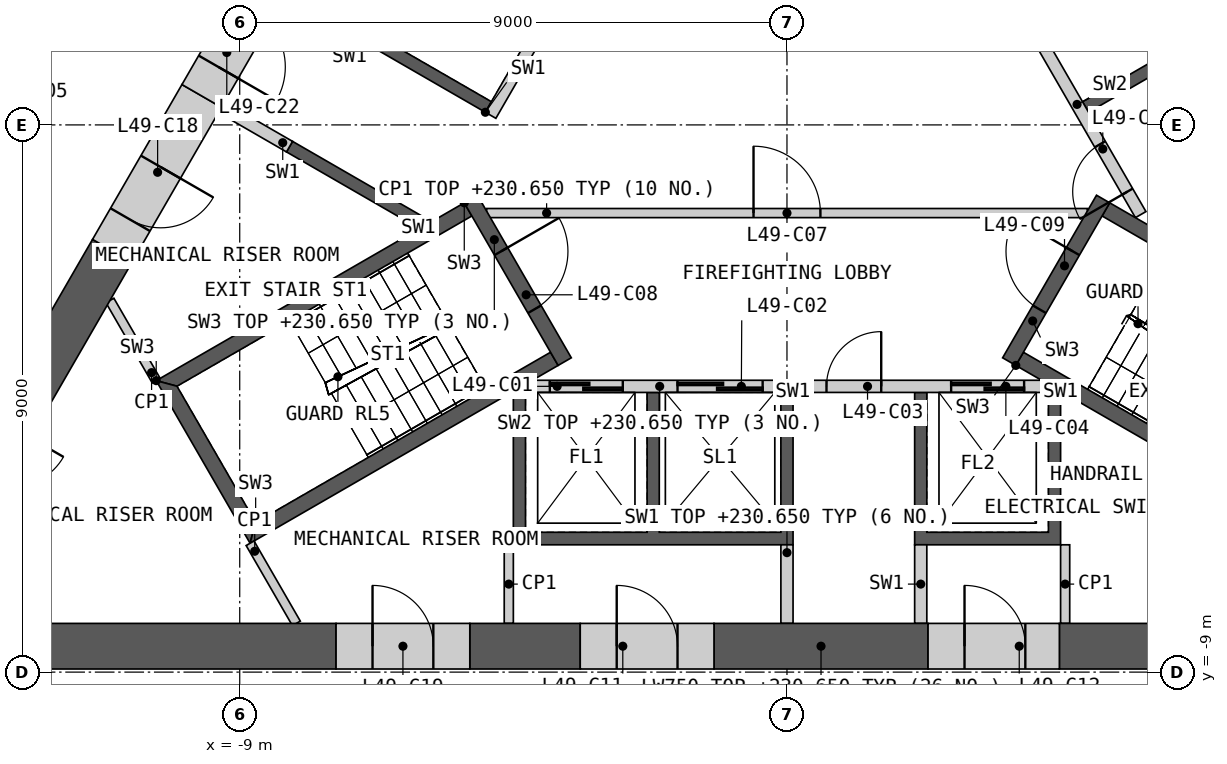
"""IFC4 building model, lengths in metres.
Left out: names, types, materials, properties, quantities, classifications, styles, units other than length and angle.
Written with IfcOpenShell. Run it as: python <this file> out.ifc"""

import sys

from ifc_helpers import new_model, si_unit, direction, frame, frame_2d, origin, place, context, subcontext, project, spatial, polyline, rectangle, outline, extrude, element, fill, save


model = new_model("IFC4")
c1 = context("Model", 3, precision=1e-05, world=origin(), true_north=direction((0.0, 1.0)))
c2 = subcontext(c1, "Body", "Model", "MODEL_VIEW")
j1 = project(units=[si_unit("LENGTHUNIT", "METRE"), si_unit("PLANEANGLEUNIT", "RADIAN")], contexts=[c1])
p1 = place(None, origin())
s1 = spatial("IfcSite", under=j1, at=p1, CompositionType="ELEMENT")
p2 = place(p1, origin())
s2 = spatial("IfcBuilding", under=s1, at=p2, CompositionType="ELEMENT")
p3 = place(p2, frame((0.0, 0.0, 226.0)))
s3 = spatial("IfcBuildingStorey", under=s2, at=p3, CompositionType="ELEMENT", Elevation=226.0)
p4 = place(p3, origin())
e1 = element("IfcWall", 1, at=p4, inside=s3, PredefinedType="SHEAR", context=c2, shape_type="SweptSolid", body=[
    extrude(outline(polyline([(4.5, -4.4), (4.5, -6.906), (2.1, -6.906), (2.1, -4.4), (2.3, -4.4), (2.3, -6.7), (4.3, -6.7), (4.3, -4.4), (4.5, -4.4)])), origin(), (0.0, 0.0, 1.0), 4.65),
])
p5 = place(p3, origin())
e2 = element("IfcWall", 2, at=p5, inside=s3, PredefinedType="SHEAR", context=c2, shape_type="SweptSolid", body=[
    extrude(outline(polyline([(0.1, -4.4), (0.1, -6.906), (-4.5, -6.906), (-4.5, -4.4), (-4.3, -4.4), (-4.3, -6.7), (-2.3, -6.7), (-2.3, -4.4), (-2.1, -4.4), (-2.1, -6.7), (-0.1, -6.7), (-0.1, -4.4), (0.1, -4.4)])), origin(), (0.0, 0.0, 1.0), 4.65),
])
p6 = place(p3, frame((-4.187, -4.3, 0.0), z_axis=(0.0, 0.0, 1.0), x_axis=(1.0, 0.0, 0.0)))
e3 = element("IfcWall", 3, at=p6, inside=s3, PredefinedType="SOLIDWALL", context=c2, shape_type="SweptSolid", body=[
    extrude(rectangle(XDim=8.373, YDim=0.2, at=frame_2d((4.187, 0.0))), origin(), (0.0, 0.0, 1.0), 4.65),
])
p7 = place(p6, frame((0.287, 0.0, 0.0)))
e4 = element("IfcOpeningElement", 4, at=p7, cuts=e3, PredefinedType="OPENING", context=c2, shape_type="SweptSolid", body=[
    extrude(rectangle(XDim=1.2, YDim=2.1, at=frame_2d((0.6, 1.05))), frame((0.0, 0.11, 0.0), z_axis=(0.0, -1.0, 0.0), x_axis=(1.0, 0.0, 0.0)), (0.0, 0.0, 1.0), 0.22),
])
p8 = place(p6, frame((2.387, 0.0, 0.0)))
e5 = element("IfcOpeningElement", 5, at=p8, cuts=e3, PredefinedType="OPENING", context=c2, shape_type="SweptSolid", body=[
    extrude(rectangle(XDim=1.4, YDim=2.1, at=frame_2d((0.7, 1.05))), frame((0.0, 0.11, 0.0), z_axis=(0.0, -1.0, 0.0), x_axis=(1.0, 0.0, 0.0)), (0.0, 0.0, 1.0), 0.22),
])
p9 = place(p6, frame((4.837, 0.0, 0.0)))
e6 = element("IfcOpeningElement", 6, at=p9, cuts=e3, PredefinedType="OPENING", context=c2, shape_type="SweptSolid", body=[
    extrude(rectangle(XDim=0.9, YDim=2.1, at=frame_2d((0.45, 1.05))), frame((0.0, 0.11, 0.0), z_axis=(0.0, -1.0, 0.0), x_axis=(1.0, 0.0, 0.0)), (0.0, 0.0, 1.0), 0.22),
])
p10 = place(p6, frame((6.887, 0.0, 0.0)))
e7 = element("IfcOpeningElement", 7, at=p10, cuts=e3, PredefinedType="OPENING", context=c2, shape_type="SweptSolid", body=[
    extrude(rectangle(XDim=1.2, YDim=2.1, at=frame_2d((0.6, 1.05))), frame((0.0, 0.11, 0.0), z_axis=(0.0, -1.0, 0.0), x_axis=(1.0, 0.0, 0.0)), (0.0, 0.0, 1.0), 0.22),
])
for number, where, z_axis, x_axis in (
    (8, (0.0, -6.906, 0.0), (0.0, 0.0, 1.0), (0.0, -1.0, 0.0)),
    (9, (2.2, -6.906, 0.0), (0.0, 0.0, 1.0), (0.0, -1.0, 0.0)),
):
    element("IfcWall", number, at=place(p3, frame(where, z_axis=z_axis, x_axis=x_axis)), inside=s3, PredefinedType="SHEAR", context=c2, shape_type="SweptSolid", body=[
        extrude(rectangle(XDim=1.293, YDim=0.2, at=frame_2d((0.646, 0.0))), origin(), (0.0, 0.0, 1.0), 4.65),
    ])
p11 = place(p3, origin())
e10 = element("IfcWall", 10, at=p11, inside=s3, PredefinedType="SHEAR", context=c2, shape_type="SweptSolid", body=[
    extrude(outline(polyline([(1.561, 6.097), (3.731, 7.35), (7.131, 1.461), (4.96, 0.208), (4.861, 0.381), (6.852, 1.531), (4.752, 5.169), (2.76, 4.019), (2.66, 4.192), (4.652, 5.342), (3.652, 7.074), (1.66, 5.924), (1.561, 6.097)])), origin(), (0.0, 0.0, 1.0), 4.65),
])
p12 = place(p3, frame((5.817, -1.476, 0.0), z_axis=(0.0, 0.0, 1.0), x_axis=(-0.500002616675, 0.866023893041, 0.0)))
e11 = element("IfcWall", 11, at=p12, inside=s3, PredefinedType="SOLIDWALL", context=c2, shape_type="SweptSolid", body=[
    extrude(rectangle(XDim=8.373, YDim=0.2, at=frame_2d((4.187, 0.0))), origin(), (0.0, 0.0, 1.0), 4.65),
])
p13 = place(p12, frame((0.437, 0.0, 0.0)))
e12 = element("IfcOpeningElement", 12, at=p13, cuts=e11, PredefinedType="OPENING", context=c2, shape_type="SweptSolid", body=[
    extrude(rectangle(XDim=0.9, YDim=2.1, at=frame_2d((0.45, 1.05))), frame((0.0, 0.11, 0.0), z_axis=(0.0, -1.0, 0.0), x_axis=(1.0, 0.0, 0.0)), (0.0, 0.0, 1.0), 0.22),
])
p14 = place(p12, frame((3.737, 0.0, 0.0)))
e13 = element("IfcOpeningElement", 13, at=p14, cuts=e11, PredefinedType="OPENING", context=c2, shape_type="SweptSolid", body=[
    extrude(rectangle(XDim=0.9, YDim=2.1, at=frame_2d((0.45, 1.05))), frame((0.0, 0.11, 0.0), z_axis=(0.0, -1.0, 0.0), x_axis=(1.0, 0.0, 0.0)), (0.0, 0.0, 1.0), 0.22),
])
p15 = place(p3, origin())
e14 = element("IfcWall", 14, at=p15, inside=s3, PredefinedType="SHEAR", context=c2, shape_type="SweptSolid", body=[
    extrude(outline(polyline([(-6.061, -1.697), (-8.231, -0.444), (-8.131, -0.271), (-5.96, -1.524), (-6.061, -1.697)])), origin(), (0.0, 0.0, 1.0), 4.65),
])
p16 = place(p3, origin())
e15 = element("IfcWall", 15, at=p16, inside=s3, PredefinedType="SHEAR", context=c2, shape_type="SweptSolid", body=[
    extrude(outline(polyline([(-4.96, 0.208), (-7.131, 1.461), (-3.731, 7.35), (-1.561, 6.097), (-1.66, 5.924), (-3.652, 7.074), (-4.652, 5.342), (-2.66, 4.192), (-2.76, 4.019), (-4.752, 5.169), (-5.752, 3.437), (-3.76, 2.287), (-3.861, 2.113), (-5.852, 3.263), (-6.852, 1.531), (-4.861, 0.381), (-4.96, 0.208)])), origin(), (0.0, 0.0, 1.0), 4.65),
])
p17 = place(p3, frame((-1.631, 5.776, 0.0), z_axis=(0.0, 0.0, 1.0), x_axis=(-0.499992876559, -0.866029516466, 0.0)))
e16 = element("IfcWall", 16, at=p17, inside=s3, PredefinedType="SOLIDWALL", context=c2, shape_type="SweptSolid", body=[
    extrude(rectangle(XDim=6.486, YDim=0.2, at=frame_2d((3.243, 0.0))), origin(), (0.0, 0.0, 1.0), 4.65),
])
p18 = place(p3, frame((-8.181, -0.357, 0.0), z_axis=(0.0, 0.0, 1.0), x_axis=(-0.866003189247, 0.500038474733, 0.0)))
e17 = element("IfcWall", 17, at=p18, inside=s3, PredefinedType="SHEAR", context=c2, shape_type="SweptSolid", body=[
    extrude(rectangle(XDim=1.293, YDim=0.2, at=frame_2d((0.646, 0.0))), origin(), (0.0, 0.0, 1.0), 4.65),
])
p19 = place(p3, frame((-4.941, -1.45, 0.0), z_axis=(0.0, 0.0, 1.0), x_axis=(1.0, 0.0, 0.0)))
e18 = element("IfcWall", 18, at=p19, inside=s3, PredefinedType="PARTITIONING", context=c2, shape_type="SweptSolid", body=[
    extrude(rectangle(XDim=9.882, YDim=0.15, at=frame_2d((4.941, 0.0))), origin(), (0.0, 0.0, 1.0), 4.65),
])
p20 = place(p19, frame((4.391, 0.0, 0.0)))
e19 = element("IfcOpeningElement", 19, at=p20, cuts=e18, PredefinedType="OPENING", context=c2, shape_type="SweptSolid", body=[
    extrude(rectangle(XDim=1.1, YDim=2.1, at=frame_2d((0.55, 1.05))), frame((0.0, 0.085, 0.0), z_axis=(0.0, -1.0, 0.0), x_axis=(1.0, 0.0, 0.0)), (0.0, 0.0, 1.0), 0.17),
])
p21 = place(p3, origin())
e20 = element("IfcWall", 20, at=p21, inside=s3, PredefinedType="SHEAR", context=c2, shape_type="SweptSolid", body=[
    extrude(outline(polyline([(-5.307, -1.281), (-10.374, -4.206), (-10.032, -4.298), (-5.182, -1.498), (-5.307, -1.281)])), origin(), (0.0, 0.0, 1.0), 4.65),
])
p22 = place(p3, origin())
e21 = element("IfcWall", 21, at=p22, inside=s3, PredefinedType="SHEAR", context=c2, shape_type="SweptSolid", body=[
    extrude(outline(polyline([(-10.374, -4.206), (-8.83, -6.881), (-8.738, -6.539), (-10.032, -4.298), (-10.374, -4.206)])), origin(), (0.0, 0.0, 1.0), 4.65),
])
p23 = place(p3, origin())
e22 = element("IfcWall", 22, at=p23, inside=s3, PredefinedType="SHEAR", context=c2, shape_type="SweptSolid", body=[
    extrude(outline(polyline([(-8.738, -6.539), (-8.83, -6.881), (-3.763, -3.956), (-3.888, -3.739), (-8.738, -6.539)])), origin(), (0.0, 0.0, 1.0), 4.65),
])
p24 = place(p3, frame((-5.199, -1.219, 0.0), z_axis=(0.0, 0.0, 1.0), x_axis=(0.499982516597, -0.866035497597, 0.0)))
e23 = element("IfcWall", 23, at=p24, inside=s3, PredefinedType="SHEAR", context=c2, shape_type="SweptSolid", body=[
    extrude(rectangle(XDim=3.088, YDim=0.25, at=frame_2d((1.544, 0.0))), origin(), (0.0, 0.0, 1.0), 4.65),
])
p25 = place(p24, frame((0.994, 0.0, 0.0)))
e24 = element("IfcOpeningElement", 24, at=p25, cuts=e23, PredefinedType="OPENING", context=c2, shape_type="SweptSolid", body=[
    extrude(rectangle(XDim=1.1, YDim=2.1, at=frame_2d((0.55, 1.05))), frame((0.0, 0.135, 0.0), z_axis=(0.0, -1.0, 0.0), x_axis=(1.0, 0.0, 0.0)), (0.0, 0.0, 1.0), 0.27),
])
p26 = place(p3, origin())
e25 = element("IfcWall", 25, at=p26, inside=s3, PredefinedType="SHEAR", context=c2, shape_type="SweptSolid", body=[
    extrude(outline(polyline([(3.763, -3.956), (8.83, -6.881), (8.738, -6.539), (3.888, -3.739), (3.763, -3.956)])), origin(), (0.0, 0.0, 1.0), 4.65),
])
p27 = place(p3, origin())
e26 = element("IfcWall", 26, at=p27, inside=s3, PredefinedType="SHEAR", context=c2, shape_type="SweptSolid", body=[
    extrude(outline(polyline([(10.032, -4.298), (10.374, -4.206), (5.307, -1.281), (5.182, -1.498), (10.032, -4.298)])), origin(), (0.0, 0.0, 1.0), 4.65),
])
p28 = place(p3, frame((3.655, -3.893, 0.0), z_axis=(0.0, 0.0, 1.0), x_axis=(0.499982516597, 0.866035497597, 0.0)))
e27 = element("IfcWall", 27, at=p28, inside=s3, PredefinedType="SHEAR", context=c2, shape_type="SweptSolid", body=[
    extrude(rectangle(XDim=3.088, YDim=0.25, at=frame_2d((1.544, 0.0))), origin(), (0.0, 0.0, 1.0), 4.65),
])
p29 = place(p28, frame((0.994, 0.0, 0.0)))
e28 = element("IfcOpeningElement", 28, at=p29, cuts=e27, PredefinedType="OPENING", context=c2, shape_type="SweptSolid", body=[
    extrude(rectangle(XDim=1.1, YDim=2.1, at=frame_2d((0.55, 1.05))), frame((0.0, 0.135, 0.0), z_axis=(0.0, -1.0, 0.0), x_axis=(1.0, 0.0, 0.0)), (0.0, 0.0, 1.0), 0.27),
])
for number, where, z_axis, x_axis in (
    (29, (4.575, -6.906, 0.0), (0.0, 0.0, 1.0), (0.0, -1.0, 0.0)),
    (30, (-4.575, -6.906, 0.0), (0.0, 0.0, 1.0), (0.0, -1.0, 0.0)),
):
    element("IfcWall", number, at=place(p3, frame(where, z_axis=z_axis, x_axis=x_axis)), inside=s3, PredefinedType="PARTITIONING", context=c2, shape_type="SweptSolid", body=[
        extrude(rectangle(XDim=1.293, YDim=0.15, at=frame_2d((0.646, 0.0))), origin(), (0.0, 0.0, 1.0), 4.65),
    ])
for number, where, z_axis, x_axis in (
    (31, (-8.83, -6.881, 0.0), (0.0, 0.0, 1.0), (0.5, -0.866, 0.0)),
    (32, (-10.374, -4.206, 0.0), (0.0, 0.0, 1.0), (-0.5, 0.866, 0.0)),
):
    element("IfcWall", number, at=place(p3, frame(where, z_axis=z_axis, x_axis=x_axis)), inside=s3, PredefinedType="PARTITIONING", context=c2, shape_type="SweptSolid", body=[
        extrude(rectangle(XDim=1.522, YDim=0.15, at=frame_2d((0.761, 0.0))), origin(), (0.0, 0.0, 1.0), 4.65),
    ])
p30 = place(p3, frame((-14.201, -8.574, 0.0), z_axis=(0.0, 0.0, 1.0), x_axis=(1.0, 0.0, 0.0)))
e33 = element("IfcWall", 33, at=p30, inside=s3, PredefinedType="SHEAR", context=c2, shape_type="SweptSolid", body=[
    extrude(rectangle(XDim=6.785, YDim=0.75, at=frame_2d((3.393, 0.0))), origin(), (0.0, 0.0, 1.0), 4.65),
])
p31 = place(p3, frame((4.48, -8.574, 0.0), z_axis=(0.0, 0.0, 1.0), x_axis=(1.0, 0.0, 0.0)))
e34 = element("IfcWall", 34, at=p31, inside=s3, PredefinedType="SHEAR", context=c2, shape_type="SweptSolid", body=[
    extrude(rectangle(XDim=3.845, YDim=0.75, at=frame_2d((1.923, 0.0))), origin(), (0.0, 0.0, 1.0), 4.65),
])
p32 = place(p3, frame((-1.2, -8.574, 0.0), z_axis=(0.0, 0.0, 1.0), x_axis=(1.0, 0.0, 0.0)))
e35 = element("IfcWall", 35, at=p32, inside=s3, PredefinedType="SHEAR", context=c2, shape_type="SweptSolid", body=[
    extrude(rectangle(XDim=3.52, YDim=0.75, at=frame_2d((1.76, 0.0))), origin(), (0.0, 0.0, 1.0), 4.65),
])
p33 = place(p3, frame((-5.216, -8.574, 0.0), z_axis=(0.0, 0.0, 1.0), x_axis=(1.0, 0.0, 0.0)))
e36 = element("IfcWall", 36, at=p33, inside=s3, PredefinedType="SHEAR", context=c2, shape_type="SweptSolid", body=[
    extrude(rectangle(XDim=1.816, YDim=0.75, at=frame_2d((0.908, 0.0))), origin(), (0.0, 0.0, 1.0), 4.65),
])
p34 = place(p3, frame((-11.096, -2.07, 0.0), z_axis=(0.0, 0.0, 1.0), x_axis=(-0.49992834617, -0.86606676919, 0.0)))
e37 = element("IfcWall", 37, at=p34, inside=s3, PredefinedType="SHEAR", context=c2, shape_type="SweptSolid", body=[
    extrude(rectangle(XDim=2.737, YDim=0.75, at=frame_2d((1.369, 0.0))), origin(), (0.0, 0.0, 1.0), 4.65),
])
p35 = place(p3, frame((-3.4, -8.574, 0.0), z_axis=(0.0, 0.0, 1.0), x_axis=(1.0, 0.0, 0.0)))
e38 = element("IfcWall", 38, at=p35, inside=s3, PredefinedType="SHEAR", context=c2, shape_type="SweptSolid", body=[
    extrude(rectangle(XDim=2.2, YDim=0.75, at=frame_2d((1.1, 0.0))), origin(), (0.0, 0.0, 1.0), 4.65),
])
p36 = place(p35, frame((0.6, 0.0, 0.0)))
e39 = element("IfcOpeningElement", 39, at=p36, cuts=e38, PredefinedType="OPENING", context=c2, shape_type="SweptSolid", body=[
    extrude(rectangle(XDim=1.0, YDim=2.1, at=frame_2d((0.5, 1.05))), frame((0.0, 0.385, 0.0), z_axis=(0.0, -1.0, 0.0), x_axis=(1.0, 0.0, 0.0)), (0.0, 0.0, 1.0), 0.77),
])
p37 = place(p3, frame((2.32, -8.574, 0.0), z_axis=(0.0, 0.0, 1.0), x_axis=(1.0, 0.0, 0.0)))
e40 = element("IfcWall", 40, at=p37, inside=s3, PredefinedType="SHEAR", context=c2, shape_type="SweptSolid", body=[
    extrude(rectangle(XDim=2.16, YDim=0.75, at=frame_2d((1.08, 0.0))), origin(), (0.0, 0.0, 1.0), 4.65),
])
p38 = place(p37, frame((0.6, 0.0, 0.0)))
e41 = element("IfcOpeningElement", 41, at=p38, cuts=e40, PredefinedType="OPENING", context=c2, shape_type="SweptSolid", body=[
    extrude(rectangle(XDim=1.0, YDim=2.1, at=frame_2d((0.5, 1.05))), frame((0.0, 0.385, 0.0), z_axis=(0.0, -1.0, 0.0), x_axis=(1.0, 0.0, 0.0)), (0.0, 0.0, 1.0), 0.77),
])
p39 = place(p3, frame((-9.625, 0.477, 0.0), z_axis=(0.0, 0.0, 1.0), x_axis=(-0.500005104963, -0.866022456413, 0.0)))
e42 = element("IfcWall", 42, at=p39, inside=s3, PredefinedType="SHEAR", context=c2, shape_type="SweptSolid", body=[
    extrude(rectangle(XDim=2.941, YDim=0.75, at=frame_2d((1.47, 0.0))), origin(), (0.0, 0.0, 1.0), 4.65),
])
p40 = place(p39, frame((1.35, 0.0, 0.0)))
e43 = element("IfcOpeningElement", 43, at=p40, cuts=e42, PredefinedType="OPENING", context=c2, shape_type="SweptSolid", body=[
    extrude(rectangle(XDim=1.0, YDim=2.1, at=frame_2d((0.5, 1.05))), frame((0.0, 0.385, 0.0), z_axis=(0.0, -1.0, 0.0), x_axis=(1.0, 0.0, 0.0)), (0.0, 0.0, 1.0), 0.77),
])
p41 = place(p3, frame((-7.416, -8.574, 0.0), z_axis=(0.0, 0.0, 1.0), x_axis=(1.0, 0.0, 0.0)))
e44 = element("IfcWall", 44, at=p41, inside=s3, PredefinedType="SHEAR", context=c2, shape_type="SweptSolid", body=[
    extrude(rectangle(XDim=2.2, YDim=0.75, at=frame_2d((1.1, 0.0))), origin(), (0.0, 0.0, 1.0), 4.65),
])
p42 = place(p41, frame((0.6, 0.0, 0.0)))
e45 = element("IfcOpeningElement", 45, at=p42, cuts=e44, PredefinedType="OPENING", context=c2, shape_type="SweptSolid", body=[
    extrude(rectangle(XDim=1.0, YDim=2.1, at=frame_2d((0.5, 1.05))), frame((0.0, 0.385, 0.0), z_axis=(0.0, -1.0, 0.0), x_axis=(1.0, 0.0, 0.0)), (0.0, 0.0, 1.0), 0.77),
])
p43 = place(p3, frame((-8.525, 2.382, 0.0), z_axis=(0.0, 0.0, 1.0), x_axis=(-0.500077893725, -0.86598042715, 0.0)))
e46 = element("IfcWall", 46, at=p43, inside=s3, PredefinedType="SHEAR", context=c2, shape_type="SweptSolid", body=[
    extrude(rectangle(XDim=2.2, YDim=0.75, at=frame_2d((1.1, 0.0))), origin(), (0.0, 0.0, 1.0), 4.65),
])
p44 = place(p43, frame((0.55, 0.0, 0.0)))
e47 = element("IfcOpeningElement", 47, at=p44, cuts=e46, PredefinedType="OPENING", context=c2, shape_type="SweptSolid", body=[
    extrude(rectangle(XDim=1.1, YDim=2.1, at=frame_2d((0.55, 1.05))), frame((0.0, 0.385, 0.0), z_axis=(0.0, -1.0, 0.0), x_axis=(1.0, 0.0, 0.0)), (0.0, 0.0, 1.0), 0.77),
])
p45 = place(p3, frame((-14.619, -2.624, 0.0), z_axis=(0.0, 0.0, 1.0), x_axis=(0.50000393355, 0.866023132736, 0.0)))
e48 = element("IfcWall", 48, at=p45, inside=s3, PredefinedType="PARTITIONING", context=c2, shape_type="SweptSolid", body=[
    extrude(rectangle(XDim=9.335, YDim=0.2, at=frame_2d((4.667, 0.0))), origin(), (0.0, 0.0, 1.0), 4.65),
])
p46 = place(p45, frame((4.118, 0.0, 0.0)))
e49 = element("IfcOpeningElement", 49, at=p46, cuts=e48, PredefinedType="OPENING", context=c2, shape_type="SweptSolid", body=[
    extrude(rectangle(XDim=1.2, YDim=2.1, at=frame_2d((0.6, 1.05))), frame((0.0, 0.11, 0.0), z_axis=(0.0, -1.0, 0.0), x_axis=(1.0, 0.0, 0.0)), (0.0, 0.0, 1.0), 0.22),
])
p47 = place(p7, origin())
e50 = element("IfcDoor", 50, at=p47, inside=s3, OperationType="SLIDING_TO_LEFT", PredefinedType="DOOR", context=c2, shape_type="SweptSolid", body=[
    extrude(rectangle(XDim=1.2, YDim=2.1, at=frame_2d((0.6, 1.05))), frame((0.0, 0.025, 0.0), z_axis=(0.0, -1.0, 0.0), x_axis=(1.0, 0.0, 0.0)), (0.0, 0.0, 1.0), 0.05),
])
fill(e4, e50)
p48 = place(p8, origin())
e51 = element("IfcDoor", 51, at=p48, inside=s3, OperationType="SLIDING_TO_LEFT", PredefinedType="DOOR", context=c2, shape_type="SweptSolid", body=[
    extrude(rectangle(XDim=1.4, YDim=2.1, at=frame_2d((0.7, 1.05))), frame((0.0, 0.025, 0.0), z_axis=(0.0, -1.0, 0.0), x_axis=(1.0, 0.0, 0.0)), (0.0, 0.0, 1.0), 0.05),
])
fill(e5, e51)
p49 = place(p9, origin())
e52 = element("IfcDoor", 52, at=p49, inside=s3, OperationType="SINGLE_SWING_RIGHT", PredefinedType="DOOR", context=c2, shape_type="SweptSolid", body=[
    extrude(rectangle(XDim=0.9, YDim=2.1, at=frame_2d((0.45, 1.05))), frame((0.0, 0.025, 0.0), z_axis=(0.0, -1.0, 0.0), x_axis=(1.0, 0.0, 0.0)), (0.0, 0.0, 1.0), 0.05),
])
fill(e6, e52)
p50 = place(p10, origin())
e53 = element("IfcDoor", 53, at=p50, inside=s3, OperationType="SLIDING_TO_LEFT", PredefinedType="DOOR", context=c2, shape_type="SweptSolid", body=[
    extrude(rectangle(XDim=1.2, YDim=2.1, at=frame_2d((0.6, 1.05))), frame((0.0, 0.025, 0.0), z_axis=(0.0, -1.0, 0.0), x_axis=(1.0, 0.0, 0.0)), (0.0, 0.0, 1.0), 0.05),
])
fill(e7, e53)
p51 = place(p13, origin())
e54 = element("IfcDoor", 54, at=p51, inside=s3, OperationType="SINGLE_SWING_LEFT", PredefinedType="DOOR", context=c2, shape_type="SweptSolid", body=[
    extrude(rectangle(XDim=0.9, YDim=2.1, at=frame_2d((0.45, 1.05))), frame((0.0, 0.025, 0.0), z_axis=(0.0, -1.0, 0.0), x_axis=(1.0, 0.0, 0.0)), (0.0, 0.0, 1.0), 0.05),
])
fill(e12, e54)
p52 = place(p20, origin())
e55 = element("IfcDoor", 55, at=p52, inside=s3, OperationType="SINGLE_SWING_LEFT", PredefinedType="DOOR", context=c2, shape_type="SweptSolid", body=[
    extrude(rectangle(XDim=1.1, YDim=2.1, at=frame_2d((0.55, 1.05))), frame((0.0, 0.025, 0.0), z_axis=(0.0, -1.0, 0.0), x_axis=(1.0, 0.0, 0.0)), (0.0, 0.0, 1.0), 0.05),
])
fill(e19, e55)
p53 = place(p25, origin())
e56 = element("IfcDoor", 56, at=p53, inside=s3, OperationType="SINGLE_SWING_LEFT", PredefinedType="DOOR", context=c2, shape_type="SweptSolid", body=[
    extrude(rectangle(XDim=1.1, YDim=2.1, at=frame_2d((0.55, 1.05))), frame((0.0, 0.025, 0.0), z_axis=(0.0, -1.0, 0.0), x_axis=(1.0, 0.0, 0.0)), (0.0, 0.0, 1.0), 0.05),
])
fill(e24, e56)
p54 = place(p29, origin())
e57 = element("IfcDoor", 57, at=p54, inside=s3, OperationType="SINGLE_SWING_RIGHT", PredefinedType="DOOR", context=c2, shape_type="SweptSolid", body=[
    extrude(rectangle(XDim=1.1, YDim=2.1, at=frame_2d((0.55, 1.05))), frame((0.0, 0.025, 0.0), z_axis=(0.0, -1.0, 0.0), x_axis=(1.0, 0.0, 0.0)), (0.0, 0.0, 1.0), 0.05),
])
fill(e28, e57)
p55 = place(p36, origin())
e58 = element("IfcDoor", 58, at=p55, inside=s3, OperationType="SINGLE_SWING_LEFT", PredefinedType="DOOR", context=c2, shape_type="SweptSolid", body=[
    extrude(rectangle(XDim=1.0, YDim=2.1, at=frame_2d((0.5, 1.05))), frame((0.0, 0.13, 0.0), z_axis=(0.0, -1.0, 0.0), x_axis=(1.0, 0.0, 0.0)), (0.0, 0.0, 1.0), 0.05),
])
fill(e39, e58)
p56 = place(p38, origin())
e59 = element("IfcDoor", 59, at=p56, inside=s3, OperationType="SINGLE_SWING_LEFT", PredefinedType="DOOR", context=c2, shape_type="SweptSolid", body=[
    extrude(rectangle(XDim=1.0, YDim=2.1, at=frame_2d((0.5, 1.05))), frame((0.0, 0.13, 0.0), z_axis=(0.0, -1.0, 0.0), x_axis=(1.0, 0.0, 0.0)), (0.0, 0.0, 1.0), 0.05),
])
fill(e41, e59)
p57 = place(p40, origin())
e60 = element("IfcDoor", 60, at=p57, inside=s3, OperationType="SINGLE_SWING_LEFT", PredefinedType="DOOR", context=c2, shape_type="SweptSolid", body=[
    extrude(rectangle(XDim=1.0, YDim=2.1, at=frame_2d((0.5, 1.05))), frame((0.0, 0.13, 0.0), z_axis=(0.0, -1.0, 0.0), x_axis=(1.0, 0.0, 0.0)), (0.0, 0.0, 1.0), 0.05),
])
fill(e43, e60)
p58 = place(p42, origin())
e61 = element("IfcDoor", 61, at=p58, inside=s3, OperationType="SINGLE_SWING_LEFT", PredefinedType="DOOR", context=c2, shape_type="SweptSolid", body=[
    extrude(rectangle(XDim=1.0, YDim=2.1, at=frame_2d((0.5, 1.05))), frame((0.0, 0.13, 0.0), z_axis=(0.0, -1.0, 0.0), x_axis=(1.0, 0.0, 0.0)), (0.0, 0.0, 1.0), 0.05),
])
fill(e45, e61)
p59 = place(p44, origin())
e62 = element("IfcDoor", 62, at=p59, inside=s3, OperationType="SINGLE_SWING_RIGHT", PredefinedType="DOOR", context=c2, shape_type="SweptSolid", body=[
    extrude(rectangle(XDim=1.1, YDim=2.1, at=frame_2d((0.55, 1.05))), frame((0.0, 0.13, 0.0), z_axis=(0.0, -1.0, 0.0), x_axis=(1.0, 0.0, 0.0)), (0.0, 0.0, 1.0), 0.05),
])
fill(e47, e62)
p60 = place(p46, origin())
e63 = element("IfcDoor", 63, at=p60, inside=s3, OperationType="SINGLE_SWING_LEFT", PredefinedType="DOOR", context=c2, shape_type="SweptSolid", body=[
    extrude(rectangle(XDim=1.2, YDim=2.1, at=frame_2d((0.6, 1.05))), frame((0.0, 0.025, 0.0), z_axis=(0.0, -1.0, 0.0), x_axis=(1.0, 0.0, 0.0)), (0.0, 0.0, 1.0), 0.05),
])
fill(e49, e63)
save(model, sys.argv[1])
